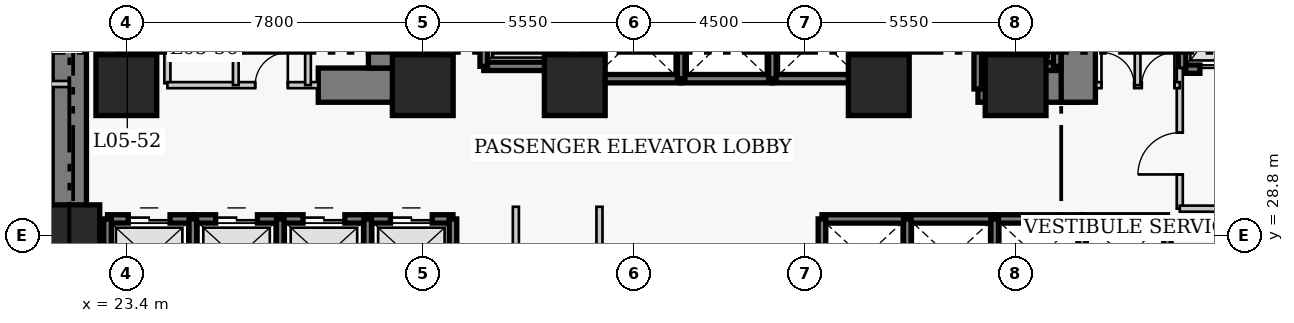
"""IFC4 building model, lengths in metres.
Left out: names, types, materials, properties, quantities, classifications, styles, units other than length and angle.
Written with IfcOpenShell. Run it as: python <this file> out.ifc"""

import sys

from ifc_helpers import new_model, si_unit, direction, frame, frame_2d, origin, origin_2d, place, context, subcontext, project, spatial, rectangle, extrude, element, fill, save


model = new_model("IFC4")
c1 = context("Model", 3, precision=1e-05, world=origin(), true_north=direction((0.0, 1.0)))
c2 = subcontext(c1, "Body", "Model", "MODEL_VIEW")
j1 = project(units=[si_unit("LENGTHUNIT", "METRE"), si_unit("PLANEANGLEUNIT", "RADIAN")], contexts=[c1])
p1 = place(None, origin())
s1 = spatial("IfcSite", under=j1, at=p1, CompositionType="ELEMENT")
p2 = place(p1, origin())
s2 = spatial("IfcBuilding", under=s1, at=p2, CompositionType="ELEMENT")
p3 = place(p2, frame((0.0, 0.0, 26.0)))
s3 = spatial("IfcBuildingStorey", under=s2, at=p3, CompositionType="ELEMENT", Elevation=26.0)
p4 = place(p3, frame((21.9, 27.05, 0.0), z_axis=(0.0, 0.0, 1.0), x_axis=(0.0, 1.0, 0.0)))
e1 = element("IfcWall", 1, at=p4, inside=s3, PredefinedType="SHEAR", context=c2, shape_type="SweptSolid", body=[
    extrude(rectangle(XDim=13.72, YDim=0.9, at=frame_2d((6.86, 0.0))), origin(), (0.0, 0.0, 1.0), 3.8),
])
p5 = place(p3, frame((28.45, 32.75, 0.0), z_axis=(0.0, 0.0, 1.0), x_axis=(1.0, 0.0, 0.0)))
e2 = element("IfcWall", 2, at=p5, inside=s3, PredefinedType="SHEAR", context=c2, shape_type="SweptSolid", body=[
    extrude(rectangle(XDim=2.4, YDim=0.9, at=frame_2d((1.2, 0.0))), origin(), (0.0, 0.0, 1.0), 3.8),
])
p6 = place(p3, frame((45.81, 32.75, 0.0), z_axis=(0.0, 0.0, 1.0), x_axis=(1.0, 0.0, 0.0)))
e3 = element("IfcWall", 3, at=p6, inside=s3, PredefinedType="SHEAR", context=c2, shape_type="SweptSolid", body=[
    extrude(rectangle(XDim=2.64, YDim=0.9, at=frame_2d((1.32, 0.0))), origin(), (0.0, 0.0, 1.0), 3.8),
])
p7 = place(p3, frame((30.22, 33.2, 0.0), z_axis=(0.0, 0.0, 1.0), x_axis=(0.0, 1.0, 0.0)))
e4 = element("IfcWall", 4, at=p7, inside=s3, PredefinedType="SHEAR", context=c2, shape_type="SweptSolid", body=[
    extrude(rectangle(XDim=7.12, YDim=0.9, at=frame_2d((3.56, 0.0))), origin(), (0.0, 0.0, 1.0), 3.8),
])
p8 = place(p3, frame((48.45, 32.3, 0.0), z_axis=(0.0, 0.0, 1.0), x_axis=(0.0, 1.0, 0.0)))
e5 = element("IfcWall", 5, at=p8, inside=s3, PredefinedType="SHEAR", context=c2, shape_type="SweptSolid", body=[
    extrude(rectangle(XDim=8.02, YDim=0.9, at=frame_2d((4.01, 0.0))), origin(), (0.0, 0.0, 1.0), 3.8),
])
p9 = place(p8, frame((5.9, 0.0, 0.0)))
e6 = element("IfcOpeningElement", 6, at=p9, cuts=e5, PredefinedType="OPENING", context=c2, shape_type="SweptSolid", body=[
    extrude(rectangle(XDim=1.1, YDim=2.15, at=frame_2d((0.55, 1.075))), frame((0.0, 0.46, 0.0), z_axis=(0.0, -1.0, 0.0), x_axis=(1.0, 0.0, 0.0)), (0.0, 0.0, 1.0), 0.92),
])
for number, where, z_axis, x_axis in (
    (7, (21.9, 28.8, 0.0), (0.0, 0.0, 1.0), (1.0, 0.0, 0.0)),
    (8, (23.4, 32.75, 0.0), (0.0, 0.0, 1.0), (1.0, 0.0, 0.0)),
    (9, (31.2, 32.75, 0.0), (0.0, 0.0, 1.0), (1.0, 0.0, 0.0)),
    (10, (35.2, 32.75, 0.0), (0.0, 0.0, 1.0), (1.0, 0.0, 0.0)),
    (11, (43.2, 32.75, 0.0), (0.0, 0.0, 1.0), (1.0, 0.0, 0.0)),
    (12, (46.8, 32.75, 0.0), (0.0, 0.0, 1.0), (1.0, 0.0, 0.0)),
):
    element("IfcColumn", number, at=place(p3, frame(where, z_axis=z_axis, x_axis=x_axis)), inside=s3, PredefinedType="COLUMN", context=c2, shape_type="SweptSolid", body=[
        extrude(rectangle(XDim=1.6, YDim=1.6, at=origin_2d()), origin(), (0.0, 0.0, 1.0), 3.8),
    ])
p10 = place(p3, frame((22.905, 29.23, 0.0), z_axis=(0.0, 0.0, 1.0), x_axis=(1.0, 0.0, 0.0)))
e13 = element("IfcWall", 13, at=p10, inside=s3, PredefinedType="SHEAR", context=c2, shape_type="SweptSolid", body=[
    extrude(rectangle(XDim=2.245, YDim=0.22, at=frame_2d((1.123, 0.0))), origin(), (0.0, 0.0, 1.0), 3.8),
])
p11 = place(p10, frame((0.545, 0.0, 0.0)))
e14 = element("IfcOpeningElement", 14, at=p11, cuts=e13, PredefinedType="OPENING", context=c2, shape_type="SweptSolid", body=[
    extrude(rectangle(XDim=1.1, YDim=2.15, at=frame_2d((0.55, 1.075))), frame((0.0, 0.12, 0.0), z_axis=(0.0, -1.0, 0.0), x_axis=(1.0, 0.0, 0.0)), (0.0, 0.0, 1.0), 0.24),
])
p12 = place(p3, frame((22.905, 27.17, 0.0), z_axis=(0.0, 0.0, 1.0), x_axis=(0.0, 1.0, 0.0)))
e15 = element("IfcWall", 15, at=p12, inside=s3, PredefinedType="SHEAR", context=c2, shape_type="SweptSolid", body=[
    extrude(rectangle(XDim=2.06, YDim=0.2, at=frame_2d((1.03, 0.0))), origin(), (0.0, 0.0, 1.0), 3.8),
])
p13 = place(p3, frame((25.15, 29.23, 0.0), z_axis=(0.0, 0.0, 1.0), x_axis=(1.0, 0.0, 0.0)))
e16 = element("IfcWall", 16, at=p13, inside=s3, PredefinedType="SHEAR", context=c2, shape_type="SweptSolid", body=[
    extrude(rectangle(XDim=2.3, YDim=0.22, at=frame_2d((1.15, 0.0))), origin(), (0.0, 0.0, 1.0), 3.8),
])
p14 = place(p13, frame((0.6, 0.0, 0.0)))
e17 = element("IfcOpeningElement", 17, at=p14, cuts=e16, PredefinedType="OPENING", context=c2, shape_type="SweptSolid", body=[
    extrude(rectangle(XDim=1.1, YDim=2.15, at=frame_2d((0.55, 1.075))), frame((0.0, 0.12, 0.0), z_axis=(0.0, -1.0, 0.0), x_axis=(1.0, 0.0, 0.0)), (0.0, 0.0, 1.0), 0.24),
])
p15 = place(p3, frame((25.15, 27.17, 0.0), z_axis=(0.0, 0.0, 1.0), x_axis=(0.0, 1.0, 0.0)))
e18 = element("IfcWall", 18, at=p15, inside=s3, PredefinedType="SHEAR", context=c2, shape_type="SweptSolid", body=[
    extrude(rectangle(XDim=2.06, YDim=0.2, at=frame_2d((1.03, 0.0))), origin(), (0.0, 0.0, 1.0), 3.8),
])
p16 = place(p3, frame((27.45, 29.23, 0.0), z_axis=(0.0, 0.0, 1.0), x_axis=(1.0, 0.0, 0.0)))
e19 = element("IfcWall", 19, at=p16, inside=s3, PredefinedType="SHEAR", context=c2, shape_type="SweptSolid", body=[
    extrude(rectangle(XDim=2.3, YDim=0.22, at=frame_2d((1.15, 0.0))), origin(), (0.0, 0.0, 1.0), 3.8),
])
p17 = place(p16, frame((0.6, 0.0, 0.0)))
e20 = element("IfcOpeningElement", 20, at=p17, cuts=e19, PredefinedType="OPENING", context=c2, shape_type="SweptSolid", body=[
    extrude(rectangle(XDim=1.1, YDim=2.15, at=frame_2d((0.55, 1.075))), frame((0.0, 0.12, 0.0), z_axis=(0.0, -1.0, 0.0), x_axis=(1.0, 0.0, 0.0)), (0.0, 0.0, 1.0), 0.24),
])
p18 = place(p3, frame((27.45, 27.17, 0.0), z_axis=(0.0, 0.0, 1.0), x_axis=(0.0, 1.0, 0.0)))
e21 = element("IfcWall", 21, at=p18, inside=s3, PredefinedType="SHEAR", context=c2, shape_type="SweptSolid", body=[
    extrude(rectangle(XDim=2.06, YDim=0.2, at=frame_2d((1.03, 0.0))), origin(), (0.0, 0.0, 1.0), 3.8),
])
p19 = place(p3, frame((29.75, 29.23, 0.0), z_axis=(0.0, 0.0, 1.0), x_axis=(1.0, 0.0, 0.0)))
e22 = element("IfcWall", 22, at=p19, inside=s3, PredefinedType="SHEAR", context=c2, shape_type="SweptSolid", body=[
    extrude(rectangle(XDim=2.245, YDim=0.22, at=frame_2d((1.123, 0.0))), origin(), (0.0, 0.0, 1.0), 3.8),
])
p20 = place(p19, frame((0.6, 0.0, 0.0)))
e23 = element("IfcOpeningElement", 23, at=p20, cuts=e22, PredefinedType="OPENING", context=c2, shape_type="SweptSolid", body=[
    extrude(rectangle(XDim=1.1, YDim=2.15, at=frame_2d((0.55, 1.075))), frame((0.0, 0.12, 0.0), z_axis=(0.0, -1.0, 0.0), x_axis=(1.0, 0.0, 0.0)), (0.0, 0.0, 1.0), 0.24),
])
for number, where, z_axis, x_axis in (
    (24, (29.75, 27.17, 0.0), (0.0, 0.0, 1.0), (0.0, 1.0, 0.0)),
    (25, (31.995, 27.17, 0.0), (0.0, 0.0, 1.0), (0.0, 1.0, 0.0)),
):
    element("IfcWall", number, at=place(p3, frame(where, z_axis=z_axis, x_axis=x_axis)), inside=s3, PredefinedType="SHEAR", context=c2, shape_type="SweptSolid", body=[
        extrude(rectangle(XDim=2.06, YDim=0.2, at=frame_2d((1.03, 0.0))), origin(), (0.0, 0.0, 1.0), 3.8),
    ])
p21 = place(p3, frame((41.705, 29.23, 0.0), z_axis=(0.0, 0.0, 1.0), x_axis=(1.0, 0.0, 0.0)))
e26 = element("IfcWall", 26, at=p21, inside=s3, PredefinedType="SHEAR", context=c2, shape_type="SweptSolid", body=[
    extrude(rectangle(XDim=2.245, YDim=0.22, at=frame_2d((1.123, 0.0))), origin(), (0.0, 0.0, 1.0), 3.8),
])
p22 = place(p3, frame((41.705, 27.17, 0.0), z_axis=(0.0, 0.0, 1.0), x_axis=(0.0, 1.0, 0.0)))
e27 = element("IfcWall", 27, at=p22, inside=s3, PredefinedType="SHEAR", context=c2, shape_type="SweptSolid", body=[
    extrude(rectangle(XDim=2.06, YDim=0.2, at=frame_2d((1.03, 0.0))), origin(), (0.0, 0.0, 1.0), 3.8),
])
p23 = place(p3, frame((43.95, 29.23, 0.0), z_axis=(0.0, 0.0, 1.0), x_axis=(1.0, 0.0, 0.0)))
e28 = element("IfcWall", 28, at=p23, inside=s3, PredefinedType="SHEAR", context=c2, shape_type="SweptSolid", body=[
    extrude(rectangle(XDim=2.3, YDim=0.22, at=frame_2d((1.15, 0.0))), origin(), (0.0, 0.0, 1.0), 3.8),
])
p24 = place(p3, frame((43.95, 27.17, 0.0), z_axis=(0.0, 0.0, 1.0), x_axis=(0.0, 1.0, 0.0)))
e29 = element("IfcWall", 29, at=p24, inside=s3, PredefinedType="SHEAR", context=c2, shape_type="SweptSolid", body=[
    extrude(rectangle(XDim=2.06, YDim=0.2, at=frame_2d((1.03, 0.0))), origin(), (0.0, 0.0, 1.0), 3.8),
])
p25 = place(p3, frame((46.25, 29.23, 0.0), z_axis=(0.0, 0.0, 1.0), x_axis=(1.0, 0.0, 0.0)))
e30 = element("IfcWall", 30, at=p25, inside=s3, PredefinedType="SHEAR", context=c2, shape_type="SweptSolid", body=[
    extrude(rectangle(XDim=2.3, YDim=0.22, at=frame_2d((1.15, 0.0))), origin(), (0.0, 0.0, 1.0), 3.8),
])
p26 = place(p3, frame((46.25, 27.17, 0.0), z_axis=(0.0, 0.0, 1.0), x_axis=(0.0, 1.0, 0.0)))
e31 = element("IfcWall", 31, at=p26, inside=s3, PredefinedType="SHEAR", context=c2, shape_type="SweptSolid", body=[
    extrude(rectangle(XDim=2.06, YDim=0.2, at=frame_2d((1.03, 0.0))), origin(), (0.0, 0.0, 1.0), 3.8),
])
p27 = place(p3, frame((48.55, 29.23, 0.0), z_axis=(0.0, 0.0, 1.0), x_axis=(1.0, 0.0, 0.0)))
e32 = element("IfcWall", 32, at=p27, inside=s3, PredefinedType="SHEAR", context=c2, shape_type="SweptSolid", body=[
    extrude(rectangle(XDim=2.245, YDim=0.22, at=frame_2d((1.123, 0.0))), origin(), (0.0, 0.0, 1.0), 3.8),
])
for number, where, z_axis, x_axis in (
    (33, (48.55, 27.17, 0.0), (0.0, 0.0, 1.0), (0.0, 1.0, 0.0)),
    (34, (50.795, 27.17, 0.0), (0.0, 0.0, 1.0), (0.0, 1.0, 0.0)),
):
    element("IfcWall", number, at=place(p3, frame(where, z_axis=z_axis, x_axis=x_axis)), inside=s3, PredefinedType="SHEAR", context=c2, shape_type="SweptSolid", body=[
        extrude(rectangle(XDim=2.06, YDim=0.2, at=frame_2d((1.03, 0.0))), origin(), (0.0, 0.0, 1.0), 3.8),
    ])
p28 = place(p3, frame((35.68, 32.92, 0.0), z_axis=(0.0, 0.0, 1.0), x_axis=(1.0, 0.0, 0.0)))
e35 = element("IfcWall", 35, at=p28, inside=s3, PredefinedType="SHEAR", context=c2, shape_type="SweptSolid", body=[
    extrude(rectangle(XDim=2.32, YDim=0.22, at=frame_2d((1.16, 0.0))), origin(), (0.0, 0.0, 1.0), 3.8),
])
p29 = place(p3, frame((35.68, 32.92, 0.0), z_axis=(0.0, 0.0, 1.0), x_axis=(0.0, 1.0, 0.0)))
e36 = element("IfcWall", 36, at=p29, inside=s3, PredefinedType="SHEAR", context=c2, shape_type="SweptSolid", body=[
    extrude(rectangle(XDim=2.16, YDim=0.2, at=frame_2d((1.08, 0.0))), origin(), (0.0, 0.0, 1.0), 3.8),
])
p30 = place(p3, frame((38.0, 32.92, 0.0), z_axis=(0.0, 0.0, 1.0), x_axis=(1.0, 0.0, 0.0)))
e37 = element("IfcWall", 37, at=p30, inside=s3, PredefinedType="SHEAR", context=c2, shape_type="SweptSolid", body=[
    extrude(rectangle(XDim=2.4, YDim=0.22, at=frame_2d((1.2, 0.0))), origin(), (0.0, 0.0, 1.0), 3.8),
])
p31 = place(p3, frame((38.0, 32.92, 0.0), z_axis=(0.0, 0.0, 1.0), x_axis=(0.0, 1.0, 0.0)))
e38 = element("IfcWall", 38, at=p31, inside=s3, PredefinedType="SHEAR", context=c2, shape_type="SweptSolid", body=[
    extrude(rectangle(XDim=2.16, YDim=0.2, at=frame_2d((1.08, 0.0))), origin(), (0.0, 0.0, 1.0), 3.8),
])
p32 = place(p3, frame((40.4, 32.92, 0.0), z_axis=(0.0, 0.0, 1.0), x_axis=(1.0, 0.0, 0.0)))
e39 = element("IfcWall", 39, at=p32, inside=s3, PredefinedType="SHEAR", context=c2, shape_type="SweptSolid", body=[
    extrude(rectangle(XDim=2.32, YDim=0.22, at=frame_2d((1.16, 0.0))), origin(), (0.0, 0.0, 1.0), 3.8),
])
for number, where, z_axis, x_axis in (
    (40, (40.4, 32.92, 0.0), (0.0, 0.0, 1.0), (0.0, 1.0, 0.0)),
    (41, (42.72, 32.92, 0.0), (0.0, 0.0, 1.0), (0.0, 1.0, 0.0)),
):
    element("IfcWall", number, at=place(p3, frame(where, z_axis=z_axis, x_axis=x_axis)), inside=s3, PredefinedType="SHEAR", context=c2, shape_type="SweptSolid", body=[
        extrude(rectangle(XDim=2.16, YDim=0.2, at=frame_2d((1.08, 0.0))), origin(), (0.0, 0.0, 1.0), 3.8),
    ])
p33 = place(p3, frame((51.18, 33.17, 0.0), z_axis=(0.0, 0.0, 1.0), x_axis=(1.0, 0.0, 0.0)))
e42 = element("IfcWall", 42, at=p33, inside=s3, PredefinedType="SHEAR", context=c2, shape_type="SweptSolid", body=[
    extrude(rectangle(XDim=2.42, YDim=0.22, at=frame_2d((1.21, 0.0))), origin(), (0.0, 0.0, 1.0), 3.8),
])
p34 = place(p33, frame((0.47, 0.0, 0.0)))
e43 = element("IfcOpeningElement", 43, at=p34, cuts=e42, PredefinedType="OPENING", context=c2, shape_type="SweptSolid", body=[
    extrude(rectangle(XDim=1.3, YDim=2.15, at=frame_2d((0.65, 1.075))), frame((0.0, 0.12, 0.0), z_axis=(0.0, -1.0, 0.0), x_axis=(1.0, 0.0, 0.0)), (0.0, 0.0, 1.0), 0.24),
])
p35 = place(p3, frame((51.18, 33.17, 0.0), z_axis=(0.0, 0.0, 1.0), x_axis=(0.0, 1.0, 0.0)))
e44 = element("IfcWall", 44, at=p35, inside=s3, PredefinedType="SHEAR", context=c2, shape_type="SweptSolid", body=[
    extrude(rectangle(XDim=2.86, YDim=0.2, at=frame_2d((1.43, 0.0))), origin(), (0.0, 0.0, 1.0), 3.8),
])
p36 = place(p3, frame((32.805, 33.245, 0.0), z_axis=(0.0, 0.0, 1.0), x_axis=(1.0, 0.0, 0.0)))
e45 = element("IfcWall", 45, at=p36, inside=s3, PredefinedType="SHEAR", context=c2, shape_type="SweptSolid", body=[
    extrude(rectangle(XDim=2.09, YDim=0.22, at=frame_2d((1.045, 0.0))), origin(), (0.0, 0.0, 1.0), 3.8),
])
for number, where, z_axis, x_axis in (
    (46, (32.805, 33.245, 0.0), (0.0, 0.0, 1.0), (0.0, 1.0, 0.0)),
    (47, (34.895, 33.245, 0.0), (0.0, 0.0, 1.0), (0.0, 1.0, 0.0)),
):
    element("IfcWall", number, at=place(p3, frame(where, z_axis=z_axis, x_axis=x_axis)), inside=s3, PredefinedType="SHEAR", context=c2, shape_type="SweptSolid", body=[
        extrude(rectangle(XDim=2.91, YDim=0.2, at=frame_2d((1.455, 0.0))), origin(), (0.0, 0.0, 1.0), 3.8),
    ])
p37 = place(p3, frame((45.805, 33.245, 0.0), z_axis=(0.0, 0.0, 1.0), x_axis=(1.0, 0.0, 0.0)))
e48 = element("IfcWall", 48, at=p37, inside=s3, PredefinedType="SHEAR", context=c2, shape_type="SweptSolid", body=[
    extrude(rectangle(XDim=2.09, YDim=0.22, at=frame_2d((1.045, 0.0))), origin(), (0.0, 0.0, 1.0), 3.8),
])
p38 = place(p3, frame((45.805, 32.65, 0.0), z_axis=(0.0, 0.0, 1.0), x_axis=(0.0, 1.0, 0.0)))
e49 = element("IfcWall", 49, at=p38, inside=s3, PredefinedType="SHEAR", context=c2, shape_type="SweptSolid", body=[
    extrude(rectangle(XDim=3.505, YDim=0.2, at=frame_2d((1.752, 0.0))), origin(), (0.0, 0.0, 1.0), 3.8),
])
p39 = place(p3, frame((47.895, 33.245, 0.0), z_axis=(0.0, 0.0, 1.0), x_axis=(0.0, 1.0, 0.0)))
e50 = element("IfcWall", 50, at=p39, inside=s3, PredefinedType="SHEAR", context=c2, shape_type="SweptSolid", body=[
    extrude(rectangle(XDim=2.91, YDim=0.2, at=frame_2d((1.455, 0.0))), origin(), (0.0, 0.0, 1.0), 3.8),
])
p40 = place(p3, frame((24.48, 32.8, 0.0), z_axis=(0.0, 0.0, 1.0), x_axis=(0.0, 1.0, 0.0)))
e51 = element("IfcWall", 51, at=p40, inside=s3, PredefinedType="PARTITIONING", context=c2, shape_type="SweptSolid", body=[
    extrude(rectangle(XDim=3.57, YDim=0.16, at=frame_2d((1.785, 0.0))), origin(), (0.0, 0.0, 1.0), 3.54),
])
p41 = place(p40, frame((1.604, 0.0, 0.0)))
e52 = element("IfcOpeningElement", 52, at=p41, cuts=e51, PredefinedType="OPENING", context=c2, shape_type="SweptSolid", body=[
    extrude(rectangle(XDim=0.9, YDim=2.1, at=frame_2d((0.45, 1.05))), frame((0.0, 0.09, 0.0), z_axis=(0.0, -1.0, 0.0), x_axis=(1.0, 0.0, 0.0)), (0.0, 0.0, 1.0), 0.18),
])
p42 = place(p3, frame((51.12, 29.5, 0.0), z_axis=(0.0, 0.0, 1.0), x_axis=(0.0, 1.0, 0.0)))
e53 = element("IfcWall", 53, at=p42, inside=s3, PredefinedType="PARTITIONING", context=c2, shape_type="SweptSolid", body=[
    extrude(rectangle(XDim=3.7, YDim=0.16, at=frame_2d((1.85, 0.0))), origin(), (0.0, 0.0, 1.0), 3.54),
])
p43 = place(p42, frame((0.9, 0.0, 0.0)))
e54 = element("IfcOpeningElement", 54, at=p43, cuts=e53, PredefinedType="OPENING", context=c2, shape_type="SweptSolid", body=[
    extrude(rectangle(XDim=1.1, YDim=2.15, at=frame_2d((0.55, 1.075))), frame((0.0, 0.09, 0.0), z_axis=(0.0, -1.0, 0.0), x_axis=(1.0, 0.0, 0.0)), (0.0, 0.0, 1.0), 0.18),
])
p44 = place(p3, frame((51.12, 29.5, 0.0), z_axis=(0.0, 0.0, 1.0), x_axis=(1.0, 0.0, 0.0)))
e55 = element("IfcWall", 55, at=p44, inside=s3, PredefinedType="PARTITIONING", context=c2, shape_type="SweptSolid", body=[
    extrude(rectangle(XDim=5.63, YDim=0.16, at=frame_2d((2.815, 0.0))), origin(), (0.0, 0.0, 1.0), 3.54),
])
p45 = place(p3, frame((24.48, 32.75, 0.0), z_axis=(0.0, 0.0, 1.0), x_axis=(1.0, 0.0, 0.0)))
e56 = element("IfcWall", 56, at=p45, inside=s3, PredefinedType="PARTITIONING", context=c2, shape_type="SweptSolid", body=[
    extrude(rectangle(XDim=3.97, YDim=0.16, at=frame_2d((1.985, 0.0))), origin(), (0.0, 0.0, 1.0), 3.54),
])
p46 = place(p45, frame((2.31, 0.0, 0.0)))
e57 = element("IfcOpeningElement", 57, at=p46, cuts=e56, PredefinedType="OPENING", context=c2, shape_type="SweptSolid", body=[
    extrude(rectangle(XDim=0.86, YDim=2.05, at=frame_2d((0.43, 1.025))), frame((0.0, 0.09, 0.0), z_axis=(0.0, -1.0, 0.0), x_axis=(1.0, 0.0, 0.0)), (0.0, 0.0, 1.0), 0.18),
])
p47 = place(p3, frame((48.92, 32.75, 0.0), z_axis=(0.0, 0.0, 1.0), x_axis=(1.0, 0.0, 0.0)))
e58 = element("IfcWall", 58, at=p47, inside=s3, PredefinedType="PARTITIONING", context=c2, shape_type="SweptSolid", body=[
    extrude(rectangle(XDim=2.2, YDim=0.16, at=frame_2d((1.1, 0.0))), origin(), (0.0, 0.0, 1.0), 3.54),
])
p48 = place(p47, frame((0.14, 0.0, 0.0)))
e59 = element("IfcOpeningElement", 59, at=p48, cuts=e58, PredefinedType="OPENING", context=c2, shape_type="SweptSolid", body=[
    extrude(rectangle(XDim=0.86, YDim=2.05, at=frame_2d((0.43, 1.025))), frame((0.0, 0.09, 0.0), z_axis=(0.0, -1.0, 0.0), x_axis=(1.0, 0.0, 0.0)), (0.0, 0.0, 1.0), 0.18),
])
p49 = place(p47, frame((1.2, 0.0, 0.0)))
e60 = element("IfcOpeningElement", 60, at=p49, cuts=e58, PredefinedType="OPENING", context=c2, shape_type="SweptSolid", body=[
    extrude(rectangle(XDim=0.86, YDim=2.05, at=frame_2d((0.43, 1.025))), frame((0.0, 0.09, 0.0), z_axis=(0.0, -1.0, 0.0), x_axis=(1.0, 0.0, 0.0)), (0.0, 0.0, 1.0), 0.18),
])
for number, where, z_axis, x_axis in (
    (61, (26.28, 32.75, 0.0), (0.0, 0.0, 1.0), (0.0, 1.0, 0.0)),
    (62, (28.18, 32.75, 0.0), (0.0, 0.0, 1.0), (0.0, 1.0, 0.0)),
    (63, (50.01, 32.75, 0.0), (0.0, 0.0, 1.0), (0.0, 1.0, 0.0)),
):
    element("IfcWall", number, at=place(p3, frame(where, z_axis=z_axis, x_axis=x_axis)), inside=s3, PredefinedType="PARTITIONING", context=c2, shape_type="SweptSolid", body=[
        extrude(rectangle(XDim=3.62, YDim=0.15, at=frame_2d((1.81, 0.0))), origin(), (0.0, 0.0, 1.0), 3.54),
    ])
for number, where, z_axis, x_axis in (
    (64, (33.65, 24.71, 0.0), (0.0, 0.0, 1.0), (0.0, 1.0, 0.0)),
    (65, (35.85, 24.71, 0.0), (0.0, 0.0, 1.0), (0.0, 1.0, 0.0)),
):
    element("IfcWall", number, at=place(p3, frame(where, z_axis=z_axis, x_axis=x_axis)), inside=s3, PredefinedType="PARTITIONING", context=c2, shape_type="SweptSolid", body=[
        extrude(rectangle(XDim=4.84, YDim=0.16, at=frame_2d((2.42, 0.0))), origin(), (0.0, 0.0, 1.0), 3.54),
    ])
p50 = place(p3, frame((18.86, 32.78, 0.0), z_axis=(0.0, 0.0, 1.0), x_axis=(1.0, 0.0, 0.0)))
e66 = element("IfcWall", 66, at=p50, inside=s3, PredefinedType="PARTITIONING", context=c2, shape_type="SweptSolid", body=[
    extrude(rectangle(XDim=3.04, YDim=0.16, at=frame_2d((1.52, 0.0))), origin(), (0.0, 0.0, 1.0), 3.54),
])
p51 = place(p11, origin())
e67 = element("IfcDoor", 67, at=p51, inside=s3, OperationType="DOUBLE_DOOR_SLIDING", PredefinedType="DOOR", context=c2, shape_type="SweptSolid", body=[
    extrude(rectangle(XDim=1.1, YDim=2.15, at=frame_2d((0.55, 1.075))), frame((0.0, 0.025, 0.0), z_axis=(0.0, -1.0, 0.0), x_axis=(1.0, 0.0, 0.0)), (0.0, 0.0, 1.0), 0.05),
])
fill(e14, e67)
p52 = place(p14, origin())
e68 = element("IfcDoor", 68, at=p52, inside=s3, OperationType="DOUBLE_DOOR_SLIDING", PredefinedType="DOOR", context=c2, shape_type="SweptSolid", body=[
    extrude(rectangle(XDim=1.1, YDim=2.15, at=frame_2d((0.55, 1.075))), frame((0.0, 0.025, 0.0), z_axis=(0.0, -1.0, 0.0), x_axis=(1.0, 0.0, 0.0)), (0.0, 0.0, 1.0), 0.05),
])
fill(e17, e68)
p53 = place(p17, origin())
e69 = element("IfcDoor", 69, at=p53, inside=s3, OperationType="DOUBLE_DOOR_SLIDING", PredefinedType="DOOR", context=c2, shape_type="SweptSolid", body=[
    extrude(rectangle(XDim=1.1, YDim=2.15, at=frame_2d((0.55, 1.075))), frame((0.0, 0.025, 0.0), z_axis=(0.0, -1.0, 0.0), x_axis=(1.0, 0.0, 0.0)), (0.0, 0.0, 1.0), 0.05),
])
fill(e20, e69)
p54 = place(p20, origin())
e70 = element("IfcDoor", 70, at=p54, inside=s3, OperationType="DOUBLE_DOOR_SLIDING", PredefinedType="DOOR", context=c2, shape_type="SweptSolid", body=[
    extrude(rectangle(XDim=1.1, YDim=2.15, at=frame_2d((0.55, 1.075))), frame((0.0, 0.025, 0.0), z_axis=(0.0, -1.0, 0.0), x_axis=(1.0, 0.0, 0.0)), (0.0, 0.0, 1.0), 0.05),
])
fill(e23, e70)
p55 = place(p34, origin())
e71 = element("IfcDoor", 71, at=p55, inside=s3, OperationType="DOUBLE_DOOR_SLIDING", PredefinedType="DOOR", context=c2, shape_type="SweptSolid", body=[
    extrude(rectangle(XDim=1.3, YDim=2.15, at=frame_2d((0.65, 1.075))), frame((0.0, 0.025, 0.0), z_axis=(0.0, -1.0, 0.0), x_axis=(1.0, 0.0, 0.0)), (0.0, 0.0, 1.0), 0.05),
])
fill(e43, e71)
p56 = place(p43, origin())
e72 = element("IfcDoor", 72, at=p56, inside=s3, OperationType="SINGLE_SWING_LEFT", PredefinedType="DOOR", context=c2, shape_type="SweptSolid", body=[
    extrude(rectangle(XDim=1.1, YDim=2.15, at=frame_2d((0.55, 1.075))), frame((0.0, 0.025, 0.0), z_axis=(0.0, -1.0, 0.0), x_axis=(1.0, 0.0, 0.0)), (0.0, 0.0, 1.0), 0.05),
])
fill(e54, e72)
p57 = place(p46, origin())
e73 = element("IfcDoor", 73, at=p57, inside=s3, OperationType="SINGLE_SWING_RIGHT", PredefinedType="DOOR", context=c2, shape_type="SweptSolid", body=[
    extrude(rectangle(XDim=0.86, YDim=2.05, at=frame_2d((0.43, 1.025))), frame((0.0, 0.025, 0.0), z_axis=(0.0, -1.0, 0.0), x_axis=(1.0, 0.0, 0.0)), (0.0, 0.0, 1.0), 0.05),
])
fill(e57, e73)
p58 = place(p48, origin())
e74 = element("IfcDoor", 74, at=p58, inside=s3, OperationType="SINGLE_SWING_LEFT", PredefinedType="DOOR", context=c2, shape_type="SweptSolid", body=[
    extrude(rectangle(XDim=0.86, YDim=2.05, at=frame_2d((0.43, 1.025))), frame((0.0, 0.025, 0.0), z_axis=(0.0, -1.0, 0.0), x_axis=(1.0, 0.0, 0.0)), (0.0, 0.0, 1.0), 0.05),
])
fill(e59, e74)
p59 = place(p49, origin())
e75 = element("IfcDoor", 75, at=p59, inside=s3, OperationType="SINGLE_SWING_RIGHT", PredefinedType="DOOR", context=c2, shape_type="SweptSolid", body=[
    extrude(rectangle(XDim=0.86, YDim=2.05, at=frame_2d((0.43, 1.025))), frame((0.0, 0.025, 0.0), z_axis=(0.0, -1.0, 0.0), x_axis=(1.0, 0.0, 0.0)), (0.0, 0.0, 1.0), 0.05),
])
fill(e60, e75)
save(model, sys.argv[1])
